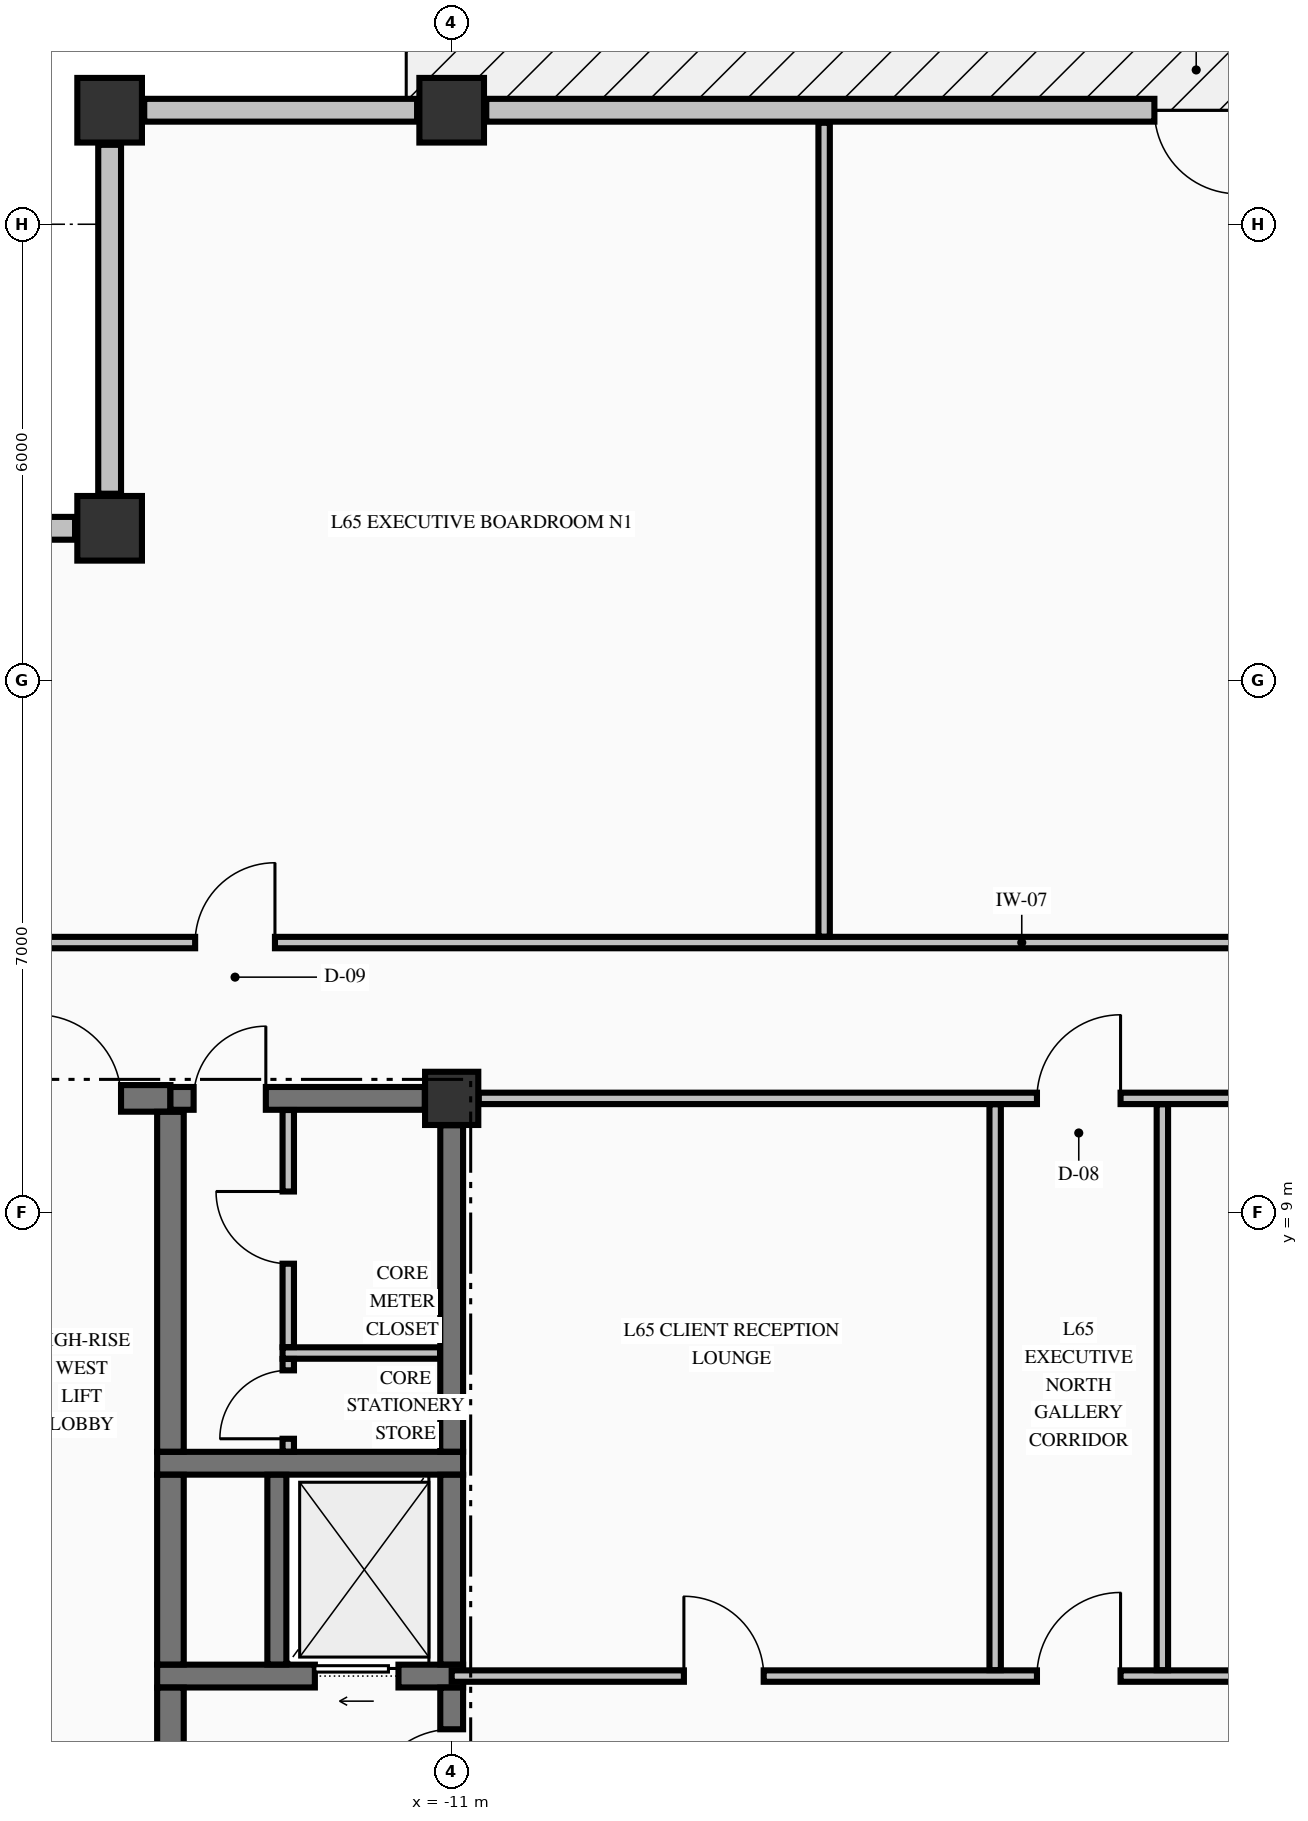
"""IFC4 building model, lengths in metres.
Left out: names, types, materials, properties, quantities, classifications, styles, units other than length and angle.
Written with IfcOpenShell. Run it as: python <this file> out.ifc"""

import sys

from ifc_helpers import new_model, si_unit, direction, frame, frame_2d, origin, origin_2d, place, context, subcontext, project, spatial, rectangle, extrude, element, fill, save


model = new_model("IFC4")
c1 = context("Model", 3, precision=1e-05, world=origin(), true_north=direction((0.0, 1.0)))
c2 = subcontext(c1, "Body", "Model", "MODEL_VIEW")
j1 = project(units=[si_unit("LENGTHUNIT", "METRE"), si_unit("PLANEANGLEUNIT", "RADIAN")], contexts=[c1])
p1 = place(None, origin())
s1 = spatial("IfcSite", under=j1, at=p1, CompositionType="ELEMENT")
p2 = place(p1, origin())
s2 = spatial("IfcBuilding", under=s1, at=p2, CompositionType="ELEMENT")
p3 = place(p2, frame((0.0, 0.0, 246.2)))
s3 = spatial("IfcBuildingStorey", under=s2, at=p3, CompositionType="ELEMENT", Elevation=246.2)
for number, where, z_axis, x_axis in (
    (1, (-15.5, 23.5, -0.25), (0.0, 0.0, 1.0), (1.0, 0.0, 0.0)),
    (2, (-11.0, 23.5, -0.25), (0.0, 0.0, 1.0), (1.0, 0.0, 0.0)),
    (3, (-15.5, 18.0, -0.25), (0.0, 0.0, 1.0), (1.0, 0.0, 0.0)),
):
    element("IfcColumn", number, at=place(p3, frame(where, z_axis=z_axis, x_axis=x_axis)), inside=s3, PredefinedType="COLUMN", context=c2, shape_type="SweptSolid", body=[
        extrude(rectangle(XDim=0.85, YDim=0.85, at=origin_2d()), origin(), (0.0, 0.0, 1.0), 3.055),
    ])
p4 = place(p3, frame((-11.0, 10.5, -0.25), z_axis=(0.0, 0.0, 1.0), x_axis=(1.0, 0.0, 0.0)))
e4 = element("IfcColumn", 4, at=p4, inside=s3, PredefinedType="COLUMN", context=c2, shape_type="SweptSolid", body=[
    extrude(rectangle(XDim=0.7, YDim=0.7, at=origin_2d()), origin(), (0.0, 0.0, 1.0), 3.055),
])
for number, where, z_axis, x_axis in (
    (5, (-15.5, 23.045, 0.0), (0.0, 0.0, 1.0), (0.0, -1.0, 0.0)),
    (6, (-15.955, 18.0, 0.0), (0.0, 0.0, 1.0), (-1.0, 0.0, 0.0)),
):
    element("IfcWall", number, at=place(p3, frame(where, z_axis=z_axis, x_axis=x_axis)), inside=s3, PredefinedType="STANDARD", context=c2, shape_type="SweptSolid", body=[
        extrude(rectangle(XDim=4.59, YDim=0.3, at=frame_2d((2.295, 0.0))), origin(), (0.0, 0.0, 1.0), 2.197),
    ])
p5 = place(p3, frame((-11.455, 23.5, 0.0), z_axis=(0.0, 0.0, 1.0), x_axis=(-1.0, 0.0, 0.0)))
e7 = element("IfcWall", 7, at=p5, inside=s3, PredefinedType="STANDARD", context=c2, shape_type="SweptSolid", body=[
    extrude(rectangle(XDim=3.59, YDim=0.3, at=frame_2d((1.795, 0.0))), origin(), (0.0, 0.0, 1.0), 2.197),
])
p6 = place(p3, frame((-0.455, 23.5, 0.0), z_axis=(0.0, 0.0, 1.0), x_axis=(-1.0, 0.0, 0.0)))
e8 = element("IfcWall", 8, at=p6, inside=s3, PredefinedType="STANDARD", context=c2, shape_type="SweptSolid", body=[
    extrude(rectangle(XDim=10.09, YDim=0.3, at=frame_2d((5.045, 0.0))), origin(), (0.0, 0.0, 1.0), 2.197),
])
p7 = place(p6, frame((0.2, 0.0, 0.0)))
e9 = element("IfcOpeningElement", 9, at=p7, cuts=e8, PredefinedType="OPENING", context=c2, shape_type="SweptSolid", body=[
    extrude(rectangle(XDim=1.1, YDim=2.05, at=frame_2d((0.55, 1.025))), frame((0.0, 0.16, 0.0), z_axis=(0.0, -1.0, 0.0), x_axis=(1.0, 0.0, 0.0)), (0.0, 0.0, 1.0), 0.32),
])
p8 = place(p3, frame((-14.875, 2.9, 0.0), z_axis=(0.0, 0.0, 1.0), x_axis=(1.0, 0.0, 0.0)))
e10 = element("IfcWall", 10, at=p8, inside=s3, PredefinedType="SHEAR", context=c2, shape_type="SweptSolid", body=[
    extrude(rectangle(XDim=4.025, YDim=0.3, at=frame_2d((2.012, 0.0))), origin(), (0.0, 0.0, 1.0), 2.805),
])
p9 = place(p8, frame((2.075, 0.0, 0.0)))
e11 = element("IfcOpeningElement", 11, at=p9, cuts=e10, PredefinedType="OPENING", context=c2, shape_type="SweptSolid", body=[
    extrude(rectangle(XDim=1.1, YDim=2.2, at=frame_2d((0.55, 1.1))), frame((0.0, 0.16, 0.0), z_axis=(0.0, -1.0, 0.0), x_axis=(1.0, 0.0, 0.0)), (0.0, 0.0, 1.0), 0.32),
])
p10 = place(p3, frame((-14.875, 5.7, 0.0), z_axis=(0.0, 0.0, 1.0), x_axis=(1.0, 0.0, 0.0)))
e12 = element("IfcWall", 12, at=p10, inside=s3, PredefinedType="SHEAR", context=c2, shape_type="SweptSolid", body=[
    extrude(rectangle(XDim=4.025, YDim=0.3, at=frame_2d((2.012, 0.0))), origin(), (0.0, 0.0, 1.0), 2.805),
])
p11 = place(p3, frame((-19.646, 10.5, 0.0), z_axis=(0.0, 0.0, 1.0), x_axis=(1.0, 0.0, 0.0)))
e13 = element("IfcWall", 13, at=p11, inside=s3, PredefinedType="SHEAR", context=c2, shape_type="SweptSolid", body=[
    extrude(rectangle(XDim=4.946, YDim=0.35, at=frame_2d((2.473, 0.0))), origin(), (0.0, 0.0, 1.0), 2.805),
])
p12 = place(p11, frame((3.196, 0.0, 0.0)))
e14 = element("IfcOpeningElement", 14, at=p12, cuts=e13, PredefinedType="OPENING", context=c2, shape_type="SweptSolid", body=[
    extrude(rectangle(XDim=1.1, YDim=2.15, at=frame_2d((0.55, 1.075))), frame((0.0, 0.185, 0.0), z_axis=(0.0, -1.0, 0.0), x_axis=(1.0, 0.0, 0.0)), (0.0, 0.0, 1.0), 0.37),
])
p13 = place(p11, frame((1.351, 0.0, 0.0)))
e15 = element("IfcOpeningElement", 15, at=p13, cuts=e13, PredefinedType="OPENING", context=c2, shape_type="SweptSolid", body=[
    extrude(rectangle(XDim=0.95, YDim=2.15, at=frame_2d((0.475, 1.075))), frame((0.0, 0.185, 0.0), z_axis=(0.0, -1.0, 0.0), x_axis=(1.0, 0.0, 0.0)), (0.0, 0.0, 1.0), 0.37),
])
p14 = place(p3, frame((-14.7, 10.5, 0.0), z_axis=(0.0, 0.0, 1.0), x_axis=(1.0, 0.0, 0.0)))
e16 = element("IfcWall", 16, at=p14, inside=s3, PredefinedType="SHEAR", context=c2, shape_type="SweptSolid", body=[
    extrude(rectangle(XDim=3.346, YDim=0.3, at=frame_2d((1.673, 0.0))), origin(), (0.0, 0.0, 1.0), 2.805),
])
p15 = place(p14, frame((0.305, 0.0, 0.0)))
e17 = element("IfcOpeningElement", 17, at=p15, cuts=e16, PredefinedType="OPENING", context=c2, shape_type="SweptSolid", body=[
    extrude(rectangle(XDim=0.95, YDim=2.15, at=frame_2d((0.475, 1.075))), frame((0.0, 0.16, 0.0), z_axis=(0.0, -1.0, 0.0), x_axis=(1.0, 0.0, 0.0)), (0.0, 0.0, 1.0), 0.32),
])
p16 = place(p3, frame((-11.0, 2.9, 0.0), z_axis=(0.0, 0.0, 1.0), x_axis=(1.0, 0.0, 0.0)))
e18 = element("IfcWall", 18, at=p16, inside=s3, PredefinedType="PARTITIONING", context=c2, shape_type="SweptSolid", body=[
    extrude(rectangle(XDim=22.0, YDim=0.15, at=frame_2d((11.0, 0.0))), origin(), (0.0, 0.0, 1.0), 2.805),
])
p17 = place(p16, frame((7.7, 0.0, 0.0)))
e19 = element("IfcOpeningElement", 19, at=p17, cuts=e18, PredefinedType="OPENING", context=c2, shape_type="SweptSolid", body=[
    extrude(rectangle(XDim=1.1, YDim=2.15, at=frame_2d((0.55, 1.075))), frame((0.0, 0.085, 0.0), z_axis=(0.0, -1.0, 0.0), x_axis=(1.0, 0.0, 0.0)), (0.0, 0.0, 1.0), 0.17),
])
p18 = place(p16, frame((3.055, 0.0, 0.0)))
e20 = element("IfcOpeningElement", 20, at=p18, cuts=e18, PredefinedType="OPENING", context=c2, shape_type="SweptSolid", body=[
    extrude(rectangle(XDim=1.05, YDim=2.15, at=frame_2d((0.525, 1.075))), frame((0.0, 0.085, 0.0), z_axis=(0.0, -1.0, 0.0), x_axis=(1.0, 0.0, 0.0)), (0.0, 0.0, 1.0), 0.17),
])
p19 = place(p16, frame((11.475, 0.0, 0.0)))
e21 = element("IfcOpeningElement", 21, at=p19, cuts=e18, PredefinedType="OPENING", context=c2, shape_type="SweptSolid", body=[
    extrude(rectangle(XDim=0.95, YDim=2.15, at=frame_2d((0.475, 1.075))), frame((0.0, 0.085, 0.0), z_axis=(0.0, -1.0, 0.0), x_axis=(1.0, 0.0, 0.0)), (0.0, 0.0, 1.0), 0.17),
])
p20 = place(p16, frame((17.795, 0.0, 0.0)))
e22 = element("IfcOpeningElement", 22, at=p20, cuts=e18, PredefinedType="OPENING", context=c2, shape_type="SweptSolid", body=[
    extrude(rectangle(XDim=0.95, YDim=2.15, at=frame_2d((0.475, 1.075))), frame((0.0, 0.085, 0.0), z_axis=(0.0, -1.0, 0.0), x_axis=(1.0, 0.0, 0.0)), (0.0, 0.0, 1.0), 0.17),
])
p21 = place(p3, frame((-13.225, 7.15, 0.0), z_axis=(0.0, 0.0, 1.0), x_axis=(1.0, 0.0, 0.0)))
e23 = element("IfcWall", 23, at=p21, inside=s3, PredefinedType="PARTITIONING", context=c2, shape_type="SweptSolid", body=[
    extrude(rectangle(XDim=2.072, YDim=0.15, at=frame_2d((1.036, 0.0))), origin(), (0.0, 0.0, 1.0), 2.805),
])
p22 = place(p3, frame((-10.644, 10.5, 0.0), z_axis=(0.0, 0.0, 1.0), x_axis=(1.0, 0.0, 0.0)))
e24 = element("IfcWall", 24, at=p22, inside=s3, PredefinedType="PARTITIONING", context=c2, shape_type="SweptSolid", body=[
    extrude(rectangle(XDim=21.288, YDim=0.15, at=frame_2d((10.644, 0.0))), origin(), (0.0, 0.0, 1.0), 2.805),
])
p23 = place(p22, frame((7.344, 0.0, 0.0)))
e25 = element("IfcOpeningElement", 25, at=p23, cuts=e24, PredefinedType="OPENING", context=c2, shape_type="SweptSolid", body=[
    extrude(rectangle(XDim=1.1, YDim=2.15, at=frame_2d((0.55, 1.075))), frame((0.0, 0.085, 0.0), z_axis=(0.0, -1.0, 0.0), x_axis=(1.0, 0.0, 0.0)), (0.0, 0.0, 1.0), 0.17),
])
p24 = place(p3, frame((-20.075, 12.55, 0.0), z_axis=(0.0, 0.0, 1.0), x_axis=(1.0, 0.0, 0.0)))
e26 = element("IfcWall", 26, at=p24, inside=s3, PredefinedType="PARTITIONING", context=c2, shape_type="SweptSolid", body=[
    extrude(rectangle(XDim=45.91, YDim=0.15, at=frame_2d((22.955, 0.0))), origin(), (0.0, 0.0, 1.0), 2.805),
])
p25 = place(p24, frame((5.7, 0.0, 0.0)))
e27 = element("IfcOpeningElement", 27, at=p25, cuts=e26, PredefinedType="OPENING", context=c2, shape_type="SweptSolid", body=[
    extrude(rectangle(XDim=1.05, YDim=2.15, at=frame_2d((0.525, 1.075))), frame((0.0, 0.085, 0.0), z_axis=(0.0, -1.0, 0.0), x_axis=(1.0, 0.0, 0.0)), (0.0, 0.0, 1.0), 0.17),
])
p26 = place(p24, frame((26.4, 0.0, 0.0)))
e28 = element("IfcOpeningElement", 28, at=p26, cuts=e26, PredefinedType="OPENING", context=c2, shape_type="SweptSolid", body=[
    extrude(rectangle(XDim=1.05, YDim=2.15, at=frame_2d((0.525, 1.075))), frame((0.0, 0.085, 0.0), z_axis=(0.0, -1.0, 0.0), x_axis=(1.0, 0.0, 0.0)), (0.0, 0.0, 1.0), 0.17),
])
p27 = place(p3, frame((-14.7, -0.098, 0.0), z_axis=(0.0, 0.0, 1.0), x_axis=(0.0, 1.0, 0.0)))
e29 = element("IfcWall", 29, at=p27, inside=s3, PredefinedType="SHEAR", context=c2, shape_type="SweptSolid", body=[
    extrude(rectangle(XDim=2.846, YDim=0.35, at=frame_2d((1.423, 0.0))), origin(), (0.0, 0.0, 1.0), 2.805),
])
p28 = place(p3, frame((-14.7, 3.052, 0.0), z_axis=(0.0, 0.0, 1.0), x_axis=(0.0, 1.0, 0.0)))
e30 = element("IfcWall", 30, at=p28, inside=s3, PredefinedType="SHEAR", context=c2, shape_type="SweptSolid", body=[
    extrude(rectangle(XDim=2.496, YDim=0.35, at=frame_2d((1.248, 0.0))), origin(), (0.0, 0.0, 1.0), 2.805),
])
p29 = place(p3, frame((-14.7, 5.852, 0.0), z_axis=(0.0, 0.0, 1.0), x_axis=(0.0, 1.0, 0.0)))
e31 = element("IfcWall", 31, at=p29, inside=s3, PredefinedType="SHEAR", context=c2, shape_type="SweptSolid", body=[
    extrude(rectangle(XDim=4.471, YDim=0.35, at=frame_2d((2.235, 0.0))), origin(), (0.0, 0.0, 1.0), 2.805),
])
p30 = place(p3, frame((-13.3, 3.052, 0.0), z_axis=(0.0, 0.0, 1.0), x_axis=(0.0, 1.0, 0.0)))
e32 = element("IfcWall", 32, at=p30, inside=s3, PredefinedType="SOLIDWALL", context=c2, shape_type="SweptSolid", body=[
    extrude(rectangle(XDim=2.496, YDim=0.25, at=frame_2d((1.248, 0.0))), origin(), (0.0, 0.0, 1.0), 2.805),
])
p31 = place(p3, frame((-11.0, 0.354, 0.0), z_axis=(0.0, 0.0, 1.0), x_axis=(0.0, 1.0, 0.0)))
e33 = element("IfcWall", 33, at=p31, inside=s3, PredefinedType="SHEAR", context=c2, shape_type="SweptSolid", body=[
    extrude(rectangle(XDim=2.394, YDim=0.3, at=frame_2d((1.197, 0.0))), origin(), (0.0, 0.0, 1.0), 2.805),
])
p32 = place(p31, frame((0.746, 0.0, 0.0)))
e34 = element("IfcOpeningElement", 34, at=p32, cuts=e33, PredefinedType="OPENING", context=c2, shape_type="SweptSolid", body=[
    extrude(rectangle(XDim=1.1, YDim=2.15, at=frame_2d((0.55, 1.075))), frame((0.0, 0.16, 0.0), z_axis=(0.0, -1.0, 0.0), x_axis=(1.0, 0.0, 0.0)), (0.0, 0.0, 1.0), 0.32),
])
p33 = place(p3, frame((-11.0, 3.052, 0.0), z_axis=(0.0, 0.0, 1.0), x_axis=(0.0, 1.0, 0.0)))
e35 = element("IfcWall", 35, at=p33, inside=s3, PredefinedType="SHEAR", context=c2, shape_type="SweptSolid", body=[
    extrude(rectangle(XDim=2.496, YDim=0.3, at=frame_2d((1.248, 0.0))), origin(), (0.0, 0.0, 1.0), 2.805),
])
p34 = place(p3, frame((-11.0, 5.852, 0.0), z_axis=(0.0, 0.0, 1.0), x_axis=(0.0, 1.0, 0.0)))
e36 = element("IfcWall", 36, at=p34, inside=s3, PredefinedType="SHEAR", context=c2, shape_type="SweptSolid", body=[
    extrude(rectangle(XDim=4.294, YDim=0.3, at=frame_2d((2.147, 0.0))), origin(), (0.0, 0.0, 1.0), 2.805),
])
p35 = place(p3, frame((-13.15, 5.853, 0.0), z_axis=(0.0, 0.0, 1.0), x_axis=(0.0, 1.0, 0.0)))
e37 = element("IfcWall", 37, at=p35, inside=s3, PredefinedType="PARTITIONING", context=c2, shape_type="SweptSolid", body=[
    extrude(rectangle(XDim=1.219, YDim=0.15, at=frame_2d((0.609, 0.0))), origin(), (0.0, 0.0, 1.0), 2.805),
])
p36 = place(p35, frame((0.169, 0.0, 0.0)))
e38 = element("IfcOpeningElement", 38, at=p36, cuts=e37, PredefinedType="OPENING", context=c2, shape_type="SweptSolid", body=[
    extrude(rectangle(XDim=0.9, YDim=2.15, at=frame_2d((0.45, 1.075))), frame((0.0, 0.085, 0.0), z_axis=(0.0, -1.0, 0.0), x_axis=(1.0, 0.0, 0.0)), (0.0, 0.0, 1.0), 0.17),
])
p37 = place(p3, frame((-13.15, 7.228, 0.0), z_axis=(0.0, 0.0, 1.0), x_axis=(0.0, 1.0, 0.0)))
e39 = element("IfcWall", 39, at=p37, inside=s3, PredefinedType="PARTITIONING", context=c2, shape_type="SweptSolid", body=[
    extrude(rectangle(XDim=3.119, YDim=0.15, at=frame_2d((1.56, 0.0))), origin(), (0.0, 0.0, 1.0), 2.805),
])
p38 = place(p37, frame((1.097, 0.0, 0.0)))
e40 = element("IfcOpeningElement", 40, at=p38, cuts=e39, PredefinedType="OPENING", context=c2, shape_type="SweptSolid", body=[
    extrude(rectangle(XDim=0.95, YDim=2.15, at=frame_2d((0.475, 1.075))), frame((0.0, 0.085, 0.0), z_axis=(0.0, -1.0, 0.0), x_axis=(1.0, 0.0, 0.0)), (0.0, 0.0, 1.0), 0.17),
])
p39 = place(p3, frame((-6.1, 12.628, 0.0), z_axis=(0.0, 0.0, 1.0), x_axis=(0.0, 1.0, 0.0)))
e41 = element("IfcWall", 41, at=p39, inside=s3, PredefinedType="PARTITIONING", context=c2, shape_type="SweptSolid", body=[
    extrude(rectangle(XDim=10.707, YDim=0.15, at=frame_2d((5.354, 0.0))), origin(), (0.0, 0.0, 1.0), 2.805),
])
for number, where, z_axis, x_axis in (
    (42, (-3.85, 2.978, 0.0), (0.0, 0.0, 1.0), (0.0, 1.0, 0.0)),
    (43, (-1.65, 2.978, 0.0), (0.0, 0.0, 1.0), (0.0, 1.0, 0.0)),
):
    element("IfcWall", number, at=place(p3, frame(where, z_axis=z_axis, x_axis=x_axis)), inside=s3, PredefinedType="PARTITIONING", context=c2, shape_type="SweptSolid", body=[
        extrude(rectangle(XDim=7.444, YDim=0.15, at=frame_2d((3.722, 0.0))), origin(), (0.0, 0.0, 1.0), 2.805),
    ])
p40 = place(p7, origin())
e44 = element("IfcDoor", 44, at=p40, inside=s3, OperationType="SINGLE_SWING_LEFT", PredefinedType="DOOR", context=c2, shape_type="SweptSolid", body=[
    extrude(rectangle(XDim=1.1, YDim=2.05, at=frame_2d((0.55, 1.025))), frame((0.0, 0.025, 0.0), z_axis=(0.0, -1.0, 0.0), x_axis=(1.0, 0.0, 0.0)), (0.0, 0.0, 1.0), 0.05),
])
fill(e9, e44)
p41 = place(p32, origin())
e45 = element("IfcDoor", 45, at=p41, inside=s3, OperationType="SINGLE_SWING_LEFT", PredefinedType="DOOR", context=c2, shape_type="SweptSolid", body=[
    extrude(rectangle(XDim=1.1, YDim=2.15, at=frame_2d((0.55, 1.075))), frame((0.0, 0.025, 0.0), z_axis=(0.0, -1.0, 0.0), x_axis=(1.0, 0.0, 0.0)), (0.0, 0.0, 1.0), 0.05),
])
fill(e34, e45)
p42 = place(p9, origin())
e46 = element("IfcDoor", 46, at=p42, inside=s3, OperationType="SLIDING_TO_LEFT", PredefinedType="DOOR", context=c2, shape_type="SweptSolid", body=[
    extrude(rectangle(XDim=1.1, YDim=2.2, at=frame_2d((0.55, 1.1))), frame((0.0, 0.025, 0.0), z_axis=(0.0, -1.0, 0.0), x_axis=(1.0, 0.0, 0.0)), (0.0, 0.0, 1.0), 0.05),
])
fill(e11, e46)
p43 = place(p15, origin())
e47 = element("IfcDoor", 47, at=p43, inside=s3, OperationType="SINGLE_SWING_RIGHT", PredefinedType="DOOR", context=c2, shape_type="SweptSolid", body=[
    extrude(rectangle(XDim=0.95, YDim=2.15, at=frame_2d((0.475, 1.075))), frame((0.0, 0.025, 0.0), z_axis=(0.0, -1.0, 0.0), x_axis=(1.0, 0.0, 0.0)), (0.0, 0.0, 1.0), 0.05),
])
fill(e17, e47)
p44 = place(p36, origin())
e48 = element("IfcDoor", 48, at=p44, inside=s3, OperationType="SINGLE_SWING_LEFT", PredefinedType="DOOR", context=c2, shape_type="SweptSolid", body=[
    extrude(rectangle(XDim=0.9, YDim=2.15, at=frame_2d((0.45, 1.075))), frame((0.0, 0.025, 0.0), z_axis=(0.0, -1.0, 0.0), x_axis=(1.0, 0.0, 0.0)), (0.0, 0.0, 1.0), 0.05),
])
fill(e38, e48)
p45 = place(p38, origin())
e49 = element("IfcDoor", 49, at=p45, inside=s3, OperationType="SINGLE_SWING_RIGHT", PredefinedType="DOOR", context=c2, shape_type="SweptSolid", body=[
    extrude(rectangle(XDim=0.95, YDim=2.15, at=frame_2d((0.475, 1.075))), frame((0.0, 0.025, 0.0), z_axis=(0.0, -1.0, 0.0), x_axis=(1.0, 0.0, 0.0)), (0.0, 0.0, 1.0), 0.05),
])
fill(e40, e49)
p46 = place(p12, origin())
e50 = element("IfcDoor", 50, at=p46, inside=s3, OperationType="SINGLE_SWING_LEFT", PredefinedType="DOOR", context=c2, shape_type="SweptSolid", body=[
    extrude(rectangle(XDim=1.1, YDim=2.15, at=frame_2d((0.55, 1.075))), frame((0.0, 0.025, 0.0), z_axis=(0.0, -1.0, 0.0), x_axis=(1.0, 0.0, 0.0)), (0.0, 0.0, 1.0), 0.05),
])
fill(e14, e50)
p47 = place(p23, origin())
e51 = element("IfcDoor", 51, at=p47, inside=s3, OperationType="SINGLE_SWING_RIGHT", PredefinedType="DOOR", context=c2, shape_type="SweptSolid", body=[
    extrude(rectangle(XDim=1.1, YDim=2.15, at=frame_2d((0.55, 1.075))), frame((0.0, 0.025, 0.0), z_axis=(0.0, -1.0, 0.0), x_axis=(1.0, 0.0, 0.0)), (0.0, 0.0, 1.0), 0.05),
])
fill(e25, e51)
p48 = place(p17, origin())
e52 = element("IfcDoor", 52, at=p48, inside=s3, OperationType="SINGLE_SWING_RIGHT", PredefinedType="DOOR", context=c2, shape_type="SweptSolid", body=[
    extrude(rectangle(XDim=1.1, YDim=2.15, at=frame_2d((0.55, 1.075))), frame((0.0, 0.025, 0.0), z_axis=(0.0, -1.0, 0.0), x_axis=(1.0, 0.0, 0.0)), (0.0, 0.0, 1.0), 0.05),
])
fill(e19, e52)
p49 = place(p25, origin())
e53 = element("IfcDoor", 53, at=p49, inside=s3, OperationType="SINGLE_SWING_RIGHT", PredefinedType="DOOR", context=c2, shape_type="SweptSolid", body=[
    extrude(rectangle(XDim=1.05, YDim=2.15, at=frame_2d((0.525, 1.075))), frame((0.0, 0.025, 0.0), z_axis=(0.0, -1.0, 0.0), x_axis=(1.0, 0.0, 0.0)), (0.0, 0.0, 1.0), 0.05),
])
fill(e27, e53)
p50 = place(p18, origin())
e54 = element("IfcDoor", 54, at=p50, inside=s3, OperationType="SINGLE_SWING_LEFT", PredefinedType="DOOR", context=c2, shape_type="SweptSolid", body=[
    extrude(rectangle(XDim=1.05, YDim=2.15, at=frame_2d((0.525, 1.075))), frame((0.0, 0.025, 0.0), z_axis=(0.0, -1.0, 0.0), x_axis=(1.0, 0.0, 0.0)), (0.0, 0.0, 1.0), 0.05),
])
fill(e20, e54)
save(model, sys.argv[1])
